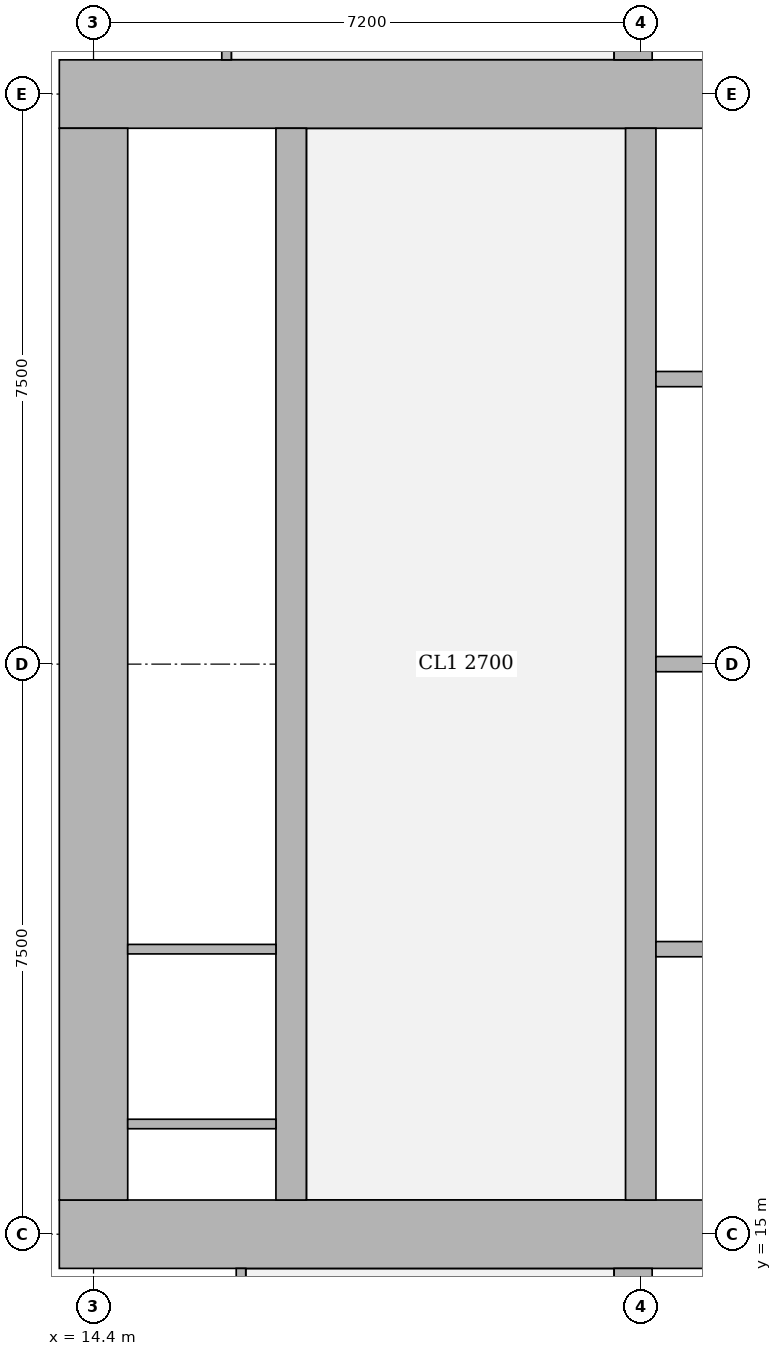
"""IFC4 building model, lengths in metres.
Left out: names, types, materials, properties, quantities, classifications, styles, units other than length and angle.
Written with IfcOpenShell. Run it as: python <this file> out.ifc"""

import sys

from ifc_helpers import new_model, si_unit, direction, frame, frame_2d, origin, place, context, subcontext, project, spatial, rectangle, extrude, element, fill, save


model = new_model("IFC4")
c1 = context("Model", 3, precision=1e-05, world=origin(), true_north=direction((0.0, 1.0)))
c2 = subcontext(c1, "Body", "Model", "MODEL_VIEW")
j1 = project(units=[si_unit("LENGTHUNIT", "METRE"), si_unit("PLANEANGLEUNIT", "RADIAN")], contexts=[c1])
p1 = place(None, origin())
s1 = spatial("IfcSite", under=j1, at=p1, CompositionType="ELEMENT")
p2 = place(p1, origin())
s2 = spatial("IfcBuilding", under=s1, at=p2, CompositionType="ELEMENT")
p3 = place(p2, frame((0.0, 0.0, 262.85)))
s3 = spatial("IfcBuildingStorey", under=s2, at=p3, CompositionType="ELEMENT", Elevation=262.85)
p4 = place(p3, frame((13.95, 15.0, 0.0), z_axis=(0.0, 0.0, 1.0), x_axis=(1.0, 0.0, 0.0)))
e1 = element("IfcWall", 1, at=p4, inside=s3, PredefinedType="SHEAR", context=c2, shape_type="SweptSolid", body=[
    extrude(rectangle(XDim=15.3, YDim=0.9, at=frame_2d((7.65, 0.0))), origin(), (0.0, 0.0, 1.0), 3.75),
])
p5 = place(p4, frame((4.45, 0.0, 0.0)))
e2 = element("IfcOpeningElement", 2, at=p5, cuts=e1, PredefinedType="OPENING", context=c2, shape_type="SweptSolid", body=[
    extrude(rectangle(XDim=1.8, YDim=2.1, at=frame_2d((0.9, 1.05))), frame((0.0, 0.46, 0.0), z_axis=(0.0, -1.0, 0.0), x_axis=(1.0, 0.0, 0.0)), (0.0, 0.0, 1.0), 0.92),
])
p6 = place(p4, frame((10.7, 0.0, 0.0)))
e3 = element("IfcOpeningElement", 3, at=p6, cuts=e1, PredefinedType="OPENING", context=c2, shape_type="SweptSolid", body=[
    extrude(rectangle(XDim=1.1, YDim=2.1, at=frame_2d((0.55, 1.05))), frame((0.0, 0.46, 0.0), z_axis=(0.0, -1.0, 0.0), x_axis=(1.0, 0.0, 0.0)), (0.0, 0.0, 1.0), 0.92),
])
p7 = place(p3, frame((13.95, 30.0, 0.0), z_axis=(0.0, 0.0, 1.0), x_axis=(1.0, 0.0, 0.0)))
e4 = element("IfcWall", 4, at=p7, inside=s3, PredefinedType="SHEAR", context=c2, shape_type="SweptSolid", body=[
    extrude(rectangle(XDim=15.3, YDim=0.9, at=frame_2d((7.65, 0.0))), origin(), (0.0, 0.0, 1.0), 3.75),
])
p8 = place(p7, frame((4.45, 0.0, 0.0)))
e5 = element("IfcOpeningElement", 5, at=p8, cuts=e4, PredefinedType="OPENING", context=c2, shape_type="SweptSolid", body=[
    extrude(rectangle(XDim=1.8, YDim=2.1, at=frame_2d((0.9, 1.05))), frame((0.0, 0.46, 0.0), z_axis=(0.0, -1.0, 0.0), x_axis=(1.0, 0.0, 0.0)), (0.0, 0.0, 1.0), 0.92),
])
p9 = place(p7, frame((10.7, 0.0, 0.0)))
e6 = element("IfcOpeningElement", 6, at=p9, cuts=e4, PredefinedType="OPENING", context=c2, shape_type="SweptSolid", body=[
    extrude(rectangle(XDim=1.1, YDim=2.1, at=frame_2d((0.55, 1.05))), frame((0.0, 0.46, 0.0), z_axis=(0.0, -1.0, 0.0), x_axis=(1.0, 0.0, 0.0)), (0.0, 0.0, 1.0), 0.92),
])
p10 = place(p3, frame((14.4, 15.45, 0.0), z_axis=(0.0, 0.0, 1.0), x_axis=(0.0, 1.0, 0.0)))
e7 = element("IfcWall", 7, at=p10, inside=s3, PredefinedType="SHEAR", context=c2, shape_type="SweptSolid", body=[
    extrude(rectangle(XDim=14.1, YDim=0.9, at=frame_2d((7.05, 0.0))), origin(), (0.0, 0.0, 1.0), 3.75),
])
p11 = place(p3, frame((17.0, 15.45, 0.0), z_axis=(0.0, 0.0, 1.0), x_axis=(0.0, 1.0, 0.0)))
e8 = element("IfcWall", 8, at=p11, inside=s3, PredefinedType="SHEAR", context=c2, shape_type="SweptSolid", body=[
    extrude(rectangle(XDim=14.1, YDim=0.4, at=frame_2d((7.05, 0.0))), origin(), (0.0, 0.0, 1.0), 3.75),
])
p12 = place(p11, frame((1.05, 0.0, 0.0)))
e9 = element("IfcOpeningElement", 9, at=p12, cuts=e8, PredefinedType="OPENING", context=c2, shape_type="SweptSolid", body=[
    extrude(rectangle(XDim=1.0, YDim=2.1, at=frame_2d((0.5, 1.05))), frame((0.0, 0.21, 0.0), z_axis=(0.0, -1.0, 0.0), x_axis=(1.0, 0.0, 0.0)), (0.0, 0.0, 1.0), 0.42),
])
p13 = place(p11, frame((4.675, 0.0, 0.0)))
e10 = element("IfcOpeningElement", 10, at=p13, cuts=e8, PredefinedType="OPENING", context=c2, shape_type="SweptSolid", body=[
    extrude(rectangle(XDim=1.0, YDim=2.1, at=frame_2d((0.5, 1.05))), frame((0.0, 0.21, 0.0), z_axis=(0.0, -1.0, 0.0), x_axis=(1.0, 0.0, 0.0)), (0.0, 0.0, 1.0), 0.42),
])
p14 = place(p11, frame((8.425, 0.0, 0.0)))
e11 = element("IfcOpeningElement", 11, at=p14, cuts=e8, PredefinedType="OPENING", context=c2, shape_type="SweptSolid", body=[
    extrude(rectangle(XDim=1.0, YDim=2.1, at=frame_2d((0.5, 1.05))), frame((0.0, 0.21, 0.0), z_axis=(0.0, -1.0, 0.0), x_axis=(1.0, 0.0, 0.0)), (0.0, 0.0, 1.0), 0.42),
])
p15 = place(p11, frame((12.175, 0.0, 0.0)))
e12 = element("IfcOpeningElement", 12, at=p15, cuts=e8, PredefinedType="OPENING", context=c2, shape_type="SweptSolid", body=[
    extrude(rectangle(XDim=1.0, YDim=2.1, at=frame_2d((0.5, 1.05))), frame((0.0, 0.21, 0.0), z_axis=(0.0, -1.0, 0.0), x_axis=(1.0, 0.0, 0.0)), (0.0, 0.0, 1.0), 0.42),
])
p16 = place(p3, frame((21.6, 15.45, 0.0), z_axis=(0.0, 0.0, 1.0), x_axis=(0.0, 1.0, 0.0)))
e13 = element("IfcWall", 13, at=p16, inside=s3, PredefinedType="SHEAR", context=c2, shape_type="SweptSolid", body=[
    extrude(rectangle(XDim=14.1, YDim=0.4, at=frame_2d((7.05, 0.0))), origin(), (0.0, 0.0, 1.0), 3.75),
])
p17 = place(p16, frame((0.875, 0.0, 0.0)))
e14 = element("IfcOpeningElement", 14, at=p17, cuts=e13, PredefinedType="OPENING", context=c2, shape_type="SweptSolid", body=[
    extrude(rectangle(XDim=1.1, YDim=2.1, at=frame_2d((0.55, 1.05))), frame((0.0, 0.21, 0.0), z_axis=(0.0, -1.0, 0.0), x_axis=(1.0, 0.0, 0.0)), (0.0, 0.0, 1.0), 0.42),
])
p18 = place(p16, frame((4.625, 0.0, 0.0)))
e15 = element("IfcOpeningElement", 15, at=p18, cuts=e13, PredefinedType="OPENING", context=c2, shape_type="SweptSolid", body=[
    extrude(rectangle(XDim=1.1, YDim=2.1, at=frame_2d((0.55, 1.05))), frame((0.0, 0.21, 0.0), z_axis=(0.0, -1.0, 0.0), x_axis=(1.0, 0.0, 0.0)), (0.0, 0.0, 1.0), 0.42),
])
p19 = place(p16, frame((8.375, 0.0, 0.0)))
e16 = element("IfcOpeningElement", 16, at=p19, cuts=e13, PredefinedType="OPENING", context=c2, shape_type="SweptSolid", body=[
    extrude(rectangle(XDim=1.1, YDim=2.1, at=frame_2d((0.55, 1.05))), frame((0.0, 0.21, 0.0), z_axis=(0.0, -1.0, 0.0), x_axis=(1.0, 0.0, 0.0)), (0.0, 0.0, 1.0), 0.42),
])
p20 = place(p16, frame((12.125, 0.0, 0.0)))
e17 = element("IfcOpeningElement", 17, at=p20, cuts=e13, PredefinedType="OPENING", context=c2, shape_type="SweptSolid", body=[
    extrude(rectangle(XDim=1.1, YDim=2.1, at=frame_2d((0.55, 1.05))), frame((0.0, 0.21, 0.0), z_axis=(0.0, -1.0, 0.0), x_axis=(1.0, 0.0, 0.0)), (0.0, 0.0, 1.0), 0.42),
])
for number, where, z_axis, x_axis in (
    (18, (21.5, 10.35, 0.0), (0.0, 0.0, 1.0), (0.0, 1.0, 0.0)),
    (19, (21.5, 30.45, 0.0), (0.0, 0.0, 1.0), (0.0, 1.0, 0.0)),
):
    element("IfcWall", number, at=place(p3, frame(where, z_axis=z_axis, x_axis=x_axis)), inside=s3, PredefinedType="SHEAR", context=c2, shape_type="SweptSolid", body=[
        extrude(rectangle(XDim=4.2, YDim=0.5, at=frame_2d((2.1, 0.0))), origin(), (0.0, 0.0, 1.0), 3.75),
    ])
p21 = place(p3, frame((16.34, 10.562, 0.0), z_axis=(0.0, 0.0, 1.0), x_axis=(0.0, 1.0, 0.0)))
e20 = element("IfcWall", 20, at=p21, inside=s3, PredefinedType="PARTITIONING", context=c2, shape_type="SweptSolid", body=[
    extrude(rectangle(XDim=3.988, YDim=0.125, at=frame_2d((1.994, 0.0))), origin(), (0.0, 0.0, 1.0), 3.5),
])
p22 = place(p21, frame((1.438, 0.0, 0.0)))
e21 = element("IfcOpeningElement", 21, at=p22, cuts=e20, PredefinedType="OPENING", context=c2, shape_type="SweptSolid", body=[
    extrude(rectangle(XDim=1.0, YDim=2.1, at=frame_2d((0.5, 1.05))), frame((0.0, 0.073, 0.0), z_axis=(0.0, -1.0, 0.0), x_axis=(1.0, 0.0, 0.0)), (0.0, 0.0, 1.0), 0.145),
])
p23 = place(p3, frame((16.15, 30.45, 0.0), z_axis=(0.0, 0.0, 1.0), x_axis=(0.0, 1.0, 0.0)))
e22 = element("IfcWall", 22, at=p23, inside=s3, PredefinedType="PARTITIONING", context=c2, shape_type="SweptSolid", body=[
    extrude(rectangle(XDim=4.387, YDim=0.125, at=frame_2d((2.193, 0.0))), origin(), (0.0, 0.0, 1.0), 3.5),
])
p24 = place(p23, frame((1.75, 0.0, 0.0)))
e23 = element("IfcOpeningElement", 23, at=p24, cuts=e22, PredefinedType="OPENING", context=c2, shape_type="SweptSolid", body=[
    extrude(rectangle(XDim=1.0, YDim=2.1, at=frame_2d((0.5, 1.05))), frame((0.0, 0.073, 0.0), z_axis=(0.0, -1.0, 0.0), x_axis=(1.0, 0.0, 0.0)), (0.0, 0.0, 1.0), 0.145),
])
p25 = place(p3, frame((14.85, 16.45, 0.0), z_axis=(0.0, 0.0, 1.0), x_axis=(1.0, 0.0, 0.0)))
e24 = element("IfcWall", 24, at=p25, inside=s3, PredefinedType="PARTITIONING", context=c2, shape_type="SweptSolid", body=[
    extrude(rectangle(XDim=1.95, YDim=0.125, at=frame_2d((0.975, 0.0))), origin(), (0.0, 0.0, 1.0), 3.5),
])
p26 = place(p25, frame((0.2, 0.0, 0.0)))
e25 = element("IfcOpeningElement", 25, at=p26, cuts=e24, PredefinedType="OPENING", context=c2, shape_type="SweptSolid", body=[
    extrude(rectangle(XDim=1.0, YDim=2.1, at=frame_2d((0.5, 1.05))), frame((0.0, 0.073, 0.0), z_axis=(0.0, -1.0, 0.0), x_axis=(1.0, 0.0, 0.0)), (0.0, 0.0, 1.0), 0.145),
])
p27 = place(p3, frame((14.85, 18.75, 0.0), z_axis=(0.0, 0.0, 1.0), x_axis=(1.0, 0.0, 0.0)))
e26 = element("IfcWall", 26, at=p27, inside=s3, PredefinedType="PARTITIONING", context=c2, shape_type="SweptSolid", body=[
    extrude(rectangle(XDim=1.95, YDim=0.125, at=frame_2d((0.975, 0.0))), origin(), (0.0, 0.0, 1.0), 3.5),
])
for number, where, z_axis, x_axis in (
    (27, (21.8, 18.75, 0.0), (0.0, 0.0, 1.0), (1.0, 0.0, 0.0)),
    (28, (21.8, 22.5, 0.0), (0.0, 0.0, 1.0), (1.0, 0.0, 0.0)),
    (29, (21.8, 26.25, 0.0), (0.0, 0.0, 1.0), (1.0, 0.0, 0.0)),
):
    element("IfcWall", number, at=place(p3, frame(where, z_axis=z_axis, x_axis=x_axis)), inside=s3, PredefinedType="SOLIDWALL", context=c2, shape_type="SweptSolid", body=[
        extrude(rectangle(XDim=2.2, YDim=0.2, at=frame_2d((1.1, 0.0))), origin(), (0.0, 0.0, 1.0), 3.5),
    ])
p28 = place(p26, origin())
e30 = element("IfcDoor", 30, at=p28, inside=s3, OperationType="SINGLE_SWING_RIGHT", PredefinedType="DOOR", context=c2, shape_type="SweptSolid", body=[
    extrude(rectangle(XDim=1.0, YDim=2.1, at=frame_2d((0.5, 1.05))), frame((0.0, 0.025, 0.0), z_axis=(0.0, -1.0, 0.0), x_axis=(1.0, 0.0, 0.0)), (0.0, 0.0, 1.0), 0.05),
])
fill(e25, e30)
p29 = place(p12, origin())
e31 = element("IfcDoor", 31, at=p29, inside=s3, OperationType="SINGLE_SWING_LEFT", PredefinedType="DOOR", context=c2, shape_type="SweptSolid", body=[
    extrude(rectangle(XDim=1.0, YDim=2.1, at=frame_2d((0.5, 1.05))), frame((0.0, 0.025, 0.0), z_axis=(0.0, -1.0, 0.0), x_axis=(1.0, 0.0, 0.0)), (0.0, 0.0, 1.0), 0.05),
])
fill(e9, e31)
p30 = place(p13, origin())
e32 = element("IfcDoor", 32, at=p30, inside=s3, OperationType="SINGLE_SWING_LEFT", PredefinedType="DOOR", context=c2, shape_type="SweptSolid", body=[
    extrude(rectangle(XDim=1.0, YDim=2.1, at=frame_2d((0.5, 1.05))), frame((0.0, 0.025, 0.0), z_axis=(0.0, -1.0, 0.0), x_axis=(1.0, 0.0, 0.0)), (0.0, 0.0, 1.0), 0.05),
])
fill(e10, e32)
p31 = place(p14, origin())
e33 = element("IfcDoor", 33, at=p31, inside=s3, OperationType="SINGLE_SWING_RIGHT", PredefinedType="DOOR", context=c2, shape_type="SweptSolid", body=[
    extrude(rectangle(XDim=1.0, YDim=2.1, at=frame_2d((0.5, 1.05))), frame((0.0, 0.025, 0.0), z_axis=(0.0, -1.0, 0.0), x_axis=(1.0, 0.0, 0.0)), (0.0, 0.0, 1.0), 0.05),
])
fill(e11, e33)
p32 = place(p15, origin())
e34 = element("IfcDoor", 34, at=p32, inside=s3, OperationType="SINGLE_SWING_RIGHT", PredefinedType="DOOR", context=c2, shape_type="SweptSolid", body=[
    extrude(rectangle(XDim=1.0, YDim=2.1, at=frame_2d((0.5, 1.05))), frame((0.0, 0.025, 0.0), z_axis=(0.0, -1.0, 0.0), x_axis=(1.0, 0.0, 0.0)), (0.0, 0.0, 1.0), 0.05),
])
fill(e12, e34)
p33 = place(p5, origin())
e35 = element("IfcDoor", 35, at=p33, inside=s3, OperationType="DOUBLE_DOOR_SINGLE_SWING", PredefinedType="DOOR", context=c2, shape_type="SweptSolid", body=[
    extrude(rectangle(XDim=1.8, YDim=2.1, at=frame_2d((0.9, 1.05))), frame((0.0, 0.025, 0.0), z_axis=(0.0, -1.0, 0.0), x_axis=(1.0, 0.0, 0.0)), (0.0, 0.0, 1.0), 0.05),
])
fill(e2, e35)
p34 = place(p8, origin())
e36 = element("IfcDoor", 36, at=p34, inside=s3, OperationType="DOUBLE_DOOR_SINGLE_SWING", PredefinedType="DOOR", context=c2, shape_type="SweptSolid", body=[
    extrude(rectangle(XDim=1.8, YDim=2.1, at=frame_2d((0.9, 1.05))), frame((0.0, 0.025, 0.0), z_axis=(0.0, -1.0, 0.0), x_axis=(1.0, 0.0, 0.0)), (0.0, 0.0, 1.0), 0.05),
])
fill(e5, e36)
p35 = place(p17, origin())
e37 = element("IfcDoor", 37, at=p35, inside=s3, OperationType="DOUBLE_DOOR_SLIDING", PredefinedType="DOOR", context=c2, shape_type="SweptSolid", body=[
    extrude(rectangle(XDim=1.1, YDim=2.1, at=frame_2d((0.55, 1.05))), frame((0.0, 0.025, 0.0), z_axis=(0.0, -1.0, 0.0), x_axis=(1.0, 0.0, 0.0)), (0.0, 0.0, 1.0), 0.05),
])
fill(e14, e37)
p36 = place(p18, origin())
e38 = element("IfcDoor", 38, at=p36, inside=s3, OperationType="DOUBLE_DOOR_SLIDING", PredefinedType="DOOR", context=c2, shape_type="SweptSolid", body=[
    extrude(rectangle(XDim=1.1, YDim=2.1, at=frame_2d((0.55, 1.05))), frame((0.0, 0.025, 0.0), z_axis=(0.0, -1.0, 0.0), x_axis=(1.0, 0.0, 0.0)), (0.0, 0.0, 1.0), 0.05),
])
fill(e15, e38)
p37 = place(p19, origin())
e39 = element("IfcDoor", 39, at=p37, inside=s3, OperationType="DOUBLE_DOOR_SLIDING", PredefinedType="DOOR", context=c2, shape_type="SweptSolid", body=[
    extrude(rectangle(XDim=1.1, YDim=2.1, at=frame_2d((0.55, 1.05))), frame((0.0, 0.025, 0.0), z_axis=(0.0, -1.0, 0.0), x_axis=(1.0, 0.0, 0.0)), (0.0, 0.0, 1.0), 0.05),
])
fill(e16, e39)
p38 = place(p20, origin())
e40 = element("IfcDoor", 40, at=p38, inside=s3, OperationType="DOUBLE_DOOR_SLIDING", PredefinedType="DOOR", context=c2, shape_type="SweptSolid", body=[
    extrude(rectangle(XDim=1.1, YDim=2.1, at=frame_2d((0.55, 1.05))), frame((0.0, 0.025, 0.0), z_axis=(0.0, -1.0, 0.0), x_axis=(1.0, 0.0, 0.0)), (0.0, 0.0, 1.0), 0.05),
])
fill(e17, e40)
save(model, sys.argv[1])
